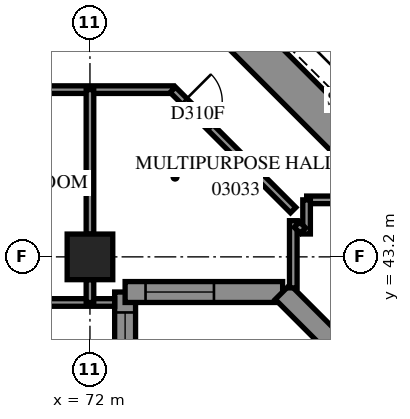
"""IFC4 building model, lengths in metres.
Left out: names, types, materials, properties, quantities, classifications, styles, units other than length and angle.
Written with IfcOpenShell. Run it as: python <this file> out.ifc"""

import sys

from ifc_helpers import new_model, si_unit, direction, frame, frame_2d, origin, origin_2d, place, context, subcontext, project, spatial, polyline, rectangle, outline, extrude, element, fill, save


model = new_model("IFC4")
c1 = context("Model", 3, precision=1e-05, world=origin(), true_north=direction((0.0, 1.0)))
c2 = subcontext(c1, "Body", "Model", "MODEL_VIEW")
j1 = project(units=[si_unit("LENGTHUNIT", "METRE"), si_unit("PLANEANGLEUNIT", "RADIAN")], contexts=[c1])
p1 = place(None, origin())
s1 = spatial("IfcSite", under=j1, at=p1, CompositionType="ELEMENT")
p2 = place(p1, origin())
s2 = spatial("IfcBuilding", under=s1, at=p2, CompositionType="ELEMENT")
p3 = place(p2, frame((0.0, 0.0, 14.4)))
s3 = spatial("IfcBuildingStorey", under=s2, at=p3, CompositionType="ELEMENT", Elevation=14.4)
p4 = place(p3, frame((72.0, 43.2, 0.0), z_axis=(0.0, 0.0, 1.0), x_axis=(1.0, 0.0, 0.0)))
e1 = element("IfcColumn", 1, at=p4, inside=s3, PredefinedType="COLUMN", context=c2, shape_type="SweptSolid", body=[
    extrude(rectangle(XDim=1.2, YDim=1.2, at=origin_2d()), origin(), (0.0, 0.0, 1.0), 3.8),
])
p5 = place(p3, frame((75.594, 49.443, -0.4), z_axis=(0.0, 0.0, 1.0), x_axis=(0.7071037324, -0.70710983, 0.0)))
e2 = element("IfcWall", 2, at=p5, inside=s3, PredefinedType="SHEAR", context=c2, shape_type="SweptSolid", body=[
    extrude(rectangle(XDim=16.4, YDim=1.0, at=frame_2d((8.2, 0.0))), origin(), (0.0, 0.0, 1.0), 3.5),
])
p6 = place(p3, frame((72.925, 27.875, 0.0), z_axis=(0.0, 0.0, 1.0), x_axis=(0.0, 1.0, 0.0)))
e3 = element("IfcWall", 3, at=p6, inside=s3, PredefinedType="SOLIDWALL", context=c2, shape_type="SweptSolid", body=[
    extrude(outline(polyline([(-0.275, -0.275), (14.125, -0.275), (14.675, 0.275), (0.275, 0.275), (-0.275, -0.275)])), origin(), (0.0, 0.0, 1.0), 3.8),
])
p7 = place(p6, frame((1.825, 0.0, 0.7)))
e4 = element("IfcOpeningElement", 4, at=p7, cuts=e3, PredefinedType="OPENING", context=c2, shape_type="SweptSolid", body=[
    extrude(rectangle(XDim=1.8, YDim=2.6, at=frame_2d((0.9, 1.3))), frame((0.0, 0.285, 0.0), z_axis=(0.0, -1.0, 0.0), x_axis=(1.0, 0.0, 0.0)), (0.0, 0.0, 1.0), 0.57),
])
p8 = place(p6, frame((5.425, 0.0, 0.7)))
e5 = element("IfcOpeningElement", 5, at=p8, cuts=e3, PredefinedType="OPENING", context=c2, shape_type="SweptSolid", body=[
    extrude(rectangle(XDim=1.8, YDim=2.6, at=frame_2d((0.9, 1.3))), frame((0.0, 0.285, 0.0), z_axis=(0.0, -1.0, 0.0), x_axis=(1.0, 0.0, 0.0)), (0.0, 0.0, 1.0), 0.57),
])
p9 = place(p6, frame((9.025, 0.0, 0.7)))
e6 = element("IfcOpeningElement", 6, at=p9, cuts=e3, PredefinedType="OPENING", context=c2, shape_type="SweptSolid", body=[
    extrude(rectangle(XDim=1.8, YDim=2.6, at=frame_2d((0.9, 1.3))), frame((0.0, 0.285, 0.0), z_axis=(0.0, -1.0, 0.0), x_axis=(1.0, 0.0, 0.0)), (0.0, 0.0, 1.0), 0.57),
])
p10 = place(p6, frame((12.062, 0.0, 0.7)))
e7 = element("IfcOpeningElement", 7, at=p10, cuts=e3, PredefinedType="OPENING", context=c2, shape_type="SweptSolid", body=[
    extrude(rectangle(XDim=1.8, YDim=2.6, at=frame_2d((0.9, 1.3))), frame((0.0, 0.285, 0.0), z_axis=(0.0, -1.0, 0.0), x_axis=(1.0, 0.0, 0.0)), (0.0, 0.0, 1.0), 0.57),
])
p11 = place(p3, frame((72.925, 42.275, 0.0), z_axis=(0.0, 0.0, 1.0), x_axis=(1.0, 0.0, 0.0)))
e8 = element("IfcWall", 8, at=p11, inside=s3, PredefinedType="SOLIDWALL", context=c2, shape_type="SweptSolid", body=[
    extrude(outline(polyline([(0.275, -0.275), (4.031, -0.275), (4.259, 0.275), (-0.275, 0.275), (0.275, -0.275)])), origin(), (0.0, 0.0, 1.0), 3.8),
])
p12 = place(p11, frame((0.537, 0.0, 0.7)))
e9 = element("IfcOpeningElement", 9, at=p12, cuts=e8, PredefinedType="OPENING", context=c2, shape_type="SweptSolid", body=[
    extrude(rectangle(XDim=1.8, YDim=2.6, at=frame_2d((0.9, 1.3))), frame((0.0, 0.285, 0.0), z_axis=(0.0, -1.0, 0.0), x_axis=(1.0, 0.0, 0.0)), (0.0, 0.0, 1.0), 0.57),
])
p13 = place(p3, frame((77.07, 42.275, 0.0), z_axis=(0.0, 0.0, 1.0), x_axis=(0.7071067812, -0.7071067812, 0.0)))
e10 = element("IfcWall", 10, at=p13, inside=s3, PredefinedType="SOLIDWALL", context=c2, shape_type="SweptSolid", body=[
    extrude(outline(polyline([(0.114, -0.275), (39.288, -0.275), (38.737, 0.275), (-0.114, 0.275), (0.114, -0.275)])), origin(), (0.0, 0.0, 1.0), 3.8),
])
p14 = place(p13, frame((2.837, 0.0, 0.7)))
e11 = element("IfcOpeningElement", 11, at=p14, cuts=e10, PredefinedType="OPENING", context=c2, shape_type="SweptSolid", body=[
    extrude(rectangle(XDim=1.8, YDim=2.6, at=frame_2d((0.9, 1.3))), frame((0.0, 0.285, 0.0), z_axis=(0.0, -1.0, 0.0), x_axis=(1.0, 0.0, 0.0)), (0.0, 0.0, 1.0), 0.57),
])
p15 = place(p13, frame((6.588, 0.0, 0.7)))
e12 = element("IfcOpeningElement", 12, at=p15, cuts=e10, PredefinedType="OPENING", context=c2, shape_type="SweptSolid", body=[
    extrude(rectangle(XDim=1.8, YDim=2.6, at=frame_2d((0.9, 1.3))), frame((0.0, 0.285, 0.0), z_axis=(0.0, -1.0, 0.0), x_axis=(1.0, 0.0, 0.0)), (0.0, 0.0, 1.0), 0.57),
])
p16 = place(p13, frame((10.188, 0.0, 0.7)))
e13 = element("IfcOpeningElement", 13, at=p16, cuts=e10, PredefinedType="OPENING", context=c2, shape_type="SweptSolid", body=[
    extrude(rectangle(XDim=1.8, YDim=2.6, at=frame_2d((0.9, 1.3))), frame((0.0, 0.285, 0.0), z_axis=(0.0, -1.0, 0.0), x_axis=(1.0, 0.0, 0.0)), (0.0, 0.0, 1.0), 0.57),
])
p17 = place(p13, frame((13.787, 0.0, 0.7)))
e14 = element("IfcOpeningElement", 14, at=p17, cuts=e10, PredefinedType="OPENING", context=c2, shape_type="SweptSolid", body=[
    extrude(rectangle(XDim=1.8, YDim=2.6, at=frame_2d((0.9, 1.3))), frame((0.0, 0.285, 0.0), z_axis=(0.0, -1.0, 0.0), x_axis=(1.0, 0.0, 0.0)), (0.0, 0.0, 1.0), 0.57),
])
p18 = place(p13, frame((17.387, 0.0, 0.7)))
e15 = element("IfcOpeningElement", 15, at=p18, cuts=e10, PredefinedType="OPENING", context=c2, shape_type="SweptSolid", body=[
    extrude(rectangle(XDim=1.8, YDim=2.6, at=frame_2d((0.9, 1.3))), frame((0.0, 0.285, 0.0), z_axis=(0.0, -1.0, 0.0), x_axis=(1.0, 0.0, 0.0)), (0.0, 0.0, 1.0), 0.57),
])
p19 = place(p13, frame((20.988, 0.0, 0.7)))
e16 = element("IfcOpeningElement", 16, at=p19, cuts=e10, PredefinedType="OPENING", context=c2, shape_type="SweptSolid", body=[
    extrude(rectangle(XDim=1.8, YDim=2.6, at=frame_2d((0.9, 1.3))), frame((0.0, 0.285, 0.0), z_axis=(0.0, -1.0, 0.0), x_axis=(1.0, 0.0, 0.0)), (0.0, 0.0, 1.0), 0.57),
])
p20 = place(p13, frame((24.587, 0.0, 0.7)))
e17 = element("IfcOpeningElement", 17, at=p20, cuts=e10, PredefinedType="OPENING", context=c2, shape_type="SweptSolid", body=[
    extrude(rectangle(XDim=1.8, YDim=2.6, at=frame_2d((0.9, 1.3))), frame((0.0, 0.285, 0.0), z_axis=(0.0, -1.0, 0.0), x_axis=(1.0, 0.0, 0.0)), (0.0, 0.0, 1.0), 0.57),
])
p21 = place(p13, frame((28.188, 0.0, 0.7)))
e18 = element("IfcOpeningElement", 18, at=p21, cuts=e10, PredefinedType="OPENING", context=c2, shape_type="SweptSolid", body=[
    extrude(rectangle(XDim=1.8, YDim=2.6, at=frame_2d((0.9, 1.3))), frame((0.0, 0.285, 0.0), z_axis=(0.0, -1.0, 0.0), x_axis=(1.0, 0.0, 0.0)), (0.0, 0.0, 1.0), 0.57),
])
p22 = place(p13, frame((31.788, 0.0, 0.7)))
e19 = element("IfcOpeningElement", 19, at=p22, cuts=e10, PredefinedType="OPENING", context=c2, shape_type="SweptSolid", body=[
    extrude(rectangle(XDim=1.8, YDim=2.6, at=frame_2d((0.9, 1.3))), frame((0.0, 0.285, 0.0), z_axis=(0.0, -1.0, 0.0), x_axis=(1.0, 0.0, 0.0)), (0.0, 0.0, 1.0), 0.57),
])
p23 = place(p13, frame((35.388, 0.0, 0.7)))
e20 = element("IfcOpeningElement", 20, at=p23, cuts=e10, PredefinedType="OPENING", context=c2, shape_type="SweptSolid", body=[
    extrude(rectangle(XDim=1.8, YDim=2.6, at=frame_2d((0.9, 1.3))), frame((0.0, 0.285, 0.0), z_axis=(0.0, -1.0, 0.0), x_axis=(1.0, 0.0, 0.0)), (0.0, 0.0, 1.0), 0.57),
])
p24 = place(p3, frame((13.75, 42.0, 0.0), z_axis=(0.0, 0.0, 1.0), x_axis=(1.0, 0.0, 0.0)))
e21 = element("IfcWall", 21, at=p24, inside=s3, PredefinedType="PARTITIONING", context=c2, shape_type="SweptSolid", body=[
    extrude(rectangle(XDim=58.9, YDim=0.2, at=frame_2d((29.45, 0.0))), origin(), (0.0, 0.0, 1.0), 3.8),
])
p25 = place(p3, frame((54.8, 47.6, 0.0), z_axis=(0.0, 0.0, 1.0), x_axis=(1.0, 0.0, 0.0)))
e22 = element("IfcWall", 22, at=p25, inside=s3, PredefinedType="PARTITIONING", context=c2, shape_type="SweptSolid", body=[
    extrude(rectangle(XDim=19.384, YDim=0.2, at=frame_2d((9.692, 0.0))), origin(), (0.0, 0.0, 1.0), 3.8),
])
p26 = place(p25, frame((8.458, 0.0, 0.0)))
e23 = element("IfcOpeningElement", 23, at=p26, cuts=e22, PredefinedType="OPENING", context=c2, shape_type="SweptSolid", body=[
    extrude(rectangle(XDim=1.0, YDim=2.1, at=frame_2d((0.5, 1.05))), frame((0.0, 0.11, 0.0), z_axis=(0.0, -1.0, 0.0), x_axis=(1.0, 0.0, 0.0)), (0.0, 0.0, 1.0), 0.22),
])
p27 = place(p25, frame((14.107, 0.0, 0.0)))
e24 = element("IfcOpeningElement", 24, at=p27, cuts=e22, PredefinedType="OPENING", context=c2, shape_type="SweptSolid", body=[
    extrude(rectangle(XDim=1.0, YDim=2.1, at=frame_2d((0.5, 1.05))), frame((0.0, 0.11, 0.0), z_axis=(0.0, -1.0, 0.0), x_axis=(1.0, 0.0, 0.0)), (0.0, 0.0, 1.0), 0.22),
])
p28 = place(p3, frame((74.181, 47.597, 0.0), z_axis=(0.0, 0.0, 1.0), x_axis=(0.7071067812, -0.7071067812, 0.0)))
e25 = element("IfcWall", 25, at=p28, inside=s3, PredefinedType="PARTITIONING", context=c2, shape_type="SweptSolid", body=[
    extrude(rectangle(XDim=4.477, YDim=0.2, at=frame_2d((2.239, 0.0))), origin(), (0.0, 0.0, 1.0), 3.8),
])
p29 = place(p28, frame((0.423, 0.0, 0.0)))
e26 = element("IfcOpeningElement", 26, at=p29, cuts=e25, PredefinedType="OPENING", context=c2, shape_type="SweptSolid", body=[
    extrude(rectangle(XDim=1.0, YDim=2.1, at=frame_2d((0.5, 1.05))), frame((0.0, 0.11, 0.0), z_axis=(0.0, -1.0, 0.0), x_axis=(1.0, 0.0, 0.0)), (0.0, 0.0, 1.0), 0.22),
])
p30 = place(p3, frame((72.0, 43.8, 0.0), z_axis=(0.0, 0.0, 1.0), x_axis=(0.0, 1.0, 0.0)))
e27 = element("IfcWall", 27, at=p30, inside=s3, PredefinedType="PARTITIONING", context=c2, shape_type="SweptSolid", body=[
    extrude(rectangle(XDim=3.8, YDim=0.2, at=frame_2d((1.9, 0.0))), origin(), (0.0, 0.0, 1.0), 3.8),
])
p31 = place(p3, frame((77.702, 44.7, 0.0), z_axis=(0.0, 0.0, 1.0), x_axis=(1.0, 0.0, 0.0)))
e28 = element("IfcWall", 28, at=p31, inside=s3, PredefinedType="PARTITIONING", context=c2, shape_type="SweptSolid", body=[
    extrude(rectangle(XDim=1.814, YDim=0.2, at=frame_2d((0.907, 0.0))), origin(), (0.0, 0.0, 1.0), 3.8),
])
p32 = place(p3, frame((77.35, 42.384, 0.0), z_axis=(0.0, 0.0, 1.0), x_axis=(0.0, 1.0, 0.0)))
e29 = element("IfcWall", 29, at=p32, inside=s3, PredefinedType="PARTITIONING", context=c2, shape_type="SweptSolid", body=[
    extrude(rectangle(XDim=1.768, YDim=0.2, at=frame_2d((0.884, 0.0))), origin(), (0.0, 0.0, 1.0), 3.8),
])
p33 = place(p3, frame((77.7, 43.802, 0.0), z_axis=(0.0, 0.0, 1.0), x_axis=(0.0, 1.0, 0.0)))
e30 = element("IfcWall", 30, at=p33, inside=s3, PredefinedType="PARTITIONING", context=c2, shape_type="SweptSolid", body=[
    extrude(rectangle(XDim=0.898, YDim=0.2, at=frame_2d((0.449, 0.0))), origin(), (0.0, 0.0, 1.0), 3.8),
])
p34 = place(p3, frame((72.0, 42.0, 0.0), z_axis=(0.0, 0.0, 1.0), x_axis=(0.0, 1.0, 0.0)))
e31 = element("IfcWall", 31, at=p34, inside=s3, PredefinedType="PARTITIONING", context=c2, shape_type="SweptSolid", body=[
    extrude(rectangle(XDim=0.6, YDim=0.2, at=frame_2d((0.3, 0.0))), origin(), (0.0, 0.0, 1.0), 3.2),
])
p35 = place(p3, frame((77.445, 44.05, 0.0), z_axis=(0.0, 0.0, 1.0), x_axis=(0.707329037, -0.7068844555, 0.0)))
e32 = element("IfcWall", 32, at=p35, inside=s3, PredefinedType="PARTITIONING", context=c2, shape_type="SweptSolid", body=[
    extrude(rectangle(XDim=0.225, YDim=0.2, at=frame_2d((0.112, 0.0))), origin(), (0.0, 0.0, 1.0), 3.8),
])
p36 = place(p10, origin())
e33 = element("IfcWindow", 33, at=p36, inside=s3, PartitioningType="SINGLE_PANEL", PredefinedType="WINDOW", context=c2, shape_type="SweptSolid", body=[
    extrude(rectangle(XDim=1.8, YDim=2.6, at=frame_2d((0.9, 1.3))), frame((0.0, 0.155, 0.0), z_axis=(0.0, -1.0, 0.0), x_axis=(1.0, 0.0, 0.0)), (0.0, 0.0, 1.0), 0.06),
])
fill(e7, e33)
p37 = place(p12, origin())
e34 = element("IfcWindow", 34, at=p37, inside=s3, PartitioningType="SINGLE_PANEL", PredefinedType="WINDOW", context=c2, shape_type="SweptSolid", body=[
    extrude(rectangle(XDim=1.8, YDim=2.6, at=frame_2d((0.9, 1.3))), frame((0.0, 0.155, 0.0), z_axis=(0.0, -1.0, 0.0), x_axis=(1.0, 0.0, 0.0)), (0.0, 0.0, 1.0), 0.06),
])
fill(e9, e34)
p38 = place(p29, origin())
e35 = element("IfcDoor", 35, at=p38, inside=s3, OperationType="SINGLE_SWING_LEFT", PredefinedType="DOOR", context=c2, shape_type="SweptSolid", body=[
    extrude(rectangle(XDim=1.0, YDim=2.1, at=frame_2d((0.5, 1.05))), frame((0.0, 0.025, 0.0), z_axis=(0.0, -1.0, 0.0), x_axis=(1.0, 0.0, 0.0)), (0.0, 0.0, 1.0), 0.05),
])
fill(e26, e35)
save(model, sys.argv[1])
